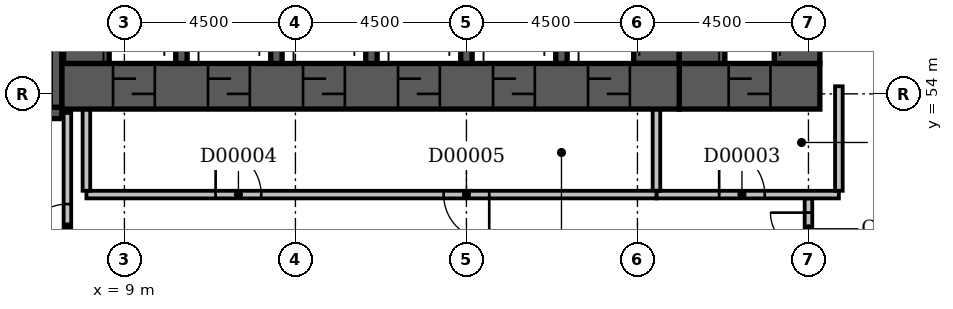
"""IFC4 building model, lengths in metres.
Left out: names, types, materials, properties, quantities, classifications, styles, units other than length and angle.
Written with IfcOpenShell. Run it as: python <this file> out.ifc"""

import sys

from ifc_helpers import new_model, si_unit, direction, frame, frame_2d, origin, place, context, subcontext, project, spatial, rectangle, extrude, element, fill, save


model = new_model("IFC4")
c1 = context("Model", 3, precision=1e-05, world=origin(), true_north=direction((0.0, 1.0)))
c2 = subcontext(c1, "Body", "Model", "MODEL_VIEW")
j1 = project(units=[si_unit("LENGTHUNIT", "METRE"), si_unit("PLANEANGLEUNIT", "RADIAN")], contexts=[c1])
p1 = place(None, origin())
s1 = spatial("IfcSite", under=j1, at=p1, CompositionType="ELEMENT")
p2 = place(p1, origin())
s2 = spatial("IfcBuilding", under=s1, at=p2, CompositionType="ELEMENT")
p3 = place(p2, origin())
s3 = spatial("IfcBuildingStorey", under=s2, at=p3, CompositionType="ELEMENT", Elevation=0.0)
p4 = place(p3, frame((0.35, 53.5, -0.45), z_axis=(0.0, 0.0, 1.0), x_axis=(1.0, 0.0, 0.0)))
e1 = element("IfcWall", 1, at=p4, inside=s3, PredefinedType="SHEAR", context=c2, shape_type="SweptSolid", body=[
    extrude(rectangle(XDim=7.0, YDim=0.3, at=frame_2d((3.5, 0.0))), origin(), (0.0, 0.0, 1.0), 8.85),
])
p5 = place(p4, frame((5.58, 0.0, 0.45)))
e2 = element("IfcOpeningElement", 2, at=p5, cuts=e1, PredefinedType="OPENING", context=c2, shape_type="SweptSolid", body=[
    extrude(rectangle(XDim=1.1, YDim=2.1, at=frame_2d((0.55, 1.05))), frame((0.0, 0.162, 0.0), z_axis=(0.0, -1.0, 0.0), x_axis=(1.0, 0.0, 0.0)), (0.0, 0.0, 1.0), 0.324),
])
p6 = place(p3, frame((7.2, 53.65, -0.45), z_axis=(0.0, 0.0, 1.0), x_axis=(0.0, 1.0, 0.0)))
e3 = element("IfcWall", 3, at=p6, inside=s3, PredefinedType="SHEAR", context=c2, shape_type="SweptSolid", body=[
    extrude(rectangle(XDim=4.2, YDim=0.3, at=frame_2d((2.1, 0.0))), origin(), (0.0, 0.0, 1.0), 8.85),
])
p7 = place(p3, frame((7.35, 54.2, -0.45), z_axis=(0.0, 0.0, 1.0), x_axis=(1.0, 0.0, 0.0)))
e4 = element("IfcWall", 4, at=p7, inside=s3, PredefinedType="SHEAR", context=c2, shape_type="SweptSolid", body=[
    extrude(rectangle(XDim=16.25, YDim=1.2, at=frame_2d((8.125, 0.0))), origin(), (0.0, 0.0, 1.0), 8.85),
])
p8 = place(p7, frame((1.35, 0.0, 0.45)))
e5 = element("IfcOpeningElement", 5, at=p8, cuts=e4, PredefinedType="OPENING", context=c2, shape_type="SweptSolid", body=[
    extrude(rectangle(XDim=1.1, YDim=2.1, at=frame_2d((0.55, 1.05))), frame((0.0, 0.612, 0.0), z_axis=(0.0, -1.0, 0.0), x_axis=(1.0, 0.0, 0.0)), (0.0, 0.0, 1.0), 1.224),
])
p9 = place(p7, frame((3.85, 0.0, 0.45)))
e6 = element("IfcOpeningElement", 6, at=p9, cuts=e4, PredefinedType="OPENING", context=c2, shape_type="SweptSolid", body=[
    extrude(rectangle(XDim=1.1, YDim=2.1, at=frame_2d((0.55, 1.05))), frame((0.0, 0.612, 0.0), z_axis=(0.0, -1.0, 0.0), x_axis=(1.0, 0.0, 0.0)), (0.0, 0.0, 1.0), 1.224),
])
p10 = place(p7, frame((6.35, 0.0, 0.45)))
e7 = element("IfcOpeningElement", 7, at=p10, cuts=e4, PredefinedType="OPENING", context=c2, shape_type="SweptSolid", body=[
    extrude(rectangle(XDim=1.1, YDim=2.1, at=frame_2d((0.55, 1.05))), frame((0.0, 0.612, 0.0), z_axis=(0.0, -1.0, 0.0), x_axis=(1.0, 0.0, 0.0)), (0.0, 0.0, 1.0), 1.224),
])
p11 = place(p7, frame((8.85, 0.0, 0.45)))
e8 = element("IfcOpeningElement", 8, at=p11, cuts=e4, PredefinedType="OPENING", context=c2, shape_type="SweptSolid", body=[
    extrude(rectangle(XDim=1.1, YDim=2.1, at=frame_2d((0.55, 1.05))), frame((0.0, 0.612, 0.0), z_axis=(0.0, -1.0, 0.0), x_axis=(1.0, 0.0, 0.0)), (0.0, 0.0, 1.0), 1.224),
])
p12 = place(p7, frame((11.35, 0.0, 0.45)))
e9 = element("IfcOpeningElement", 9, at=p12, cuts=e4, PredefinedType="OPENING", context=c2, shape_type="SweptSolid", body=[
    extrude(rectangle(XDim=1.1, YDim=2.1, at=frame_2d((0.55, 1.05))), frame((0.0, 0.612, 0.0), z_axis=(0.0, -1.0, 0.0), x_axis=(1.0, 0.0, 0.0)), (0.0, 0.0, 1.0), 1.224),
])
p13 = place(p7, frame((13.85, 0.0, 0.45)))
e10 = element("IfcOpeningElement", 10, at=p13, cuts=e4, PredefinedType="OPENING", context=c2, shape_type="SweptSolid", body=[
    extrude(rectangle(XDim=1.1, YDim=2.1, at=frame_2d((0.55, 1.05))), frame((0.0, 0.612, 0.0), z_axis=(0.0, -1.0, 0.0), x_axis=(1.0, 0.0, 0.0)), (0.0, 0.0, 1.0), 1.224),
])
p14 = place(p3, frame((8.0, 54.8, -0.45), z_axis=(0.0, 0.0, 1.0), x_axis=(0.0, 1.0, 0.0)))
e11 = element("IfcWall", 11, at=p14, inside=s3, PredefinedType="SHEAR", context=c2, shape_type="SweptSolid", body=[
    extrude(rectangle(XDim=2.6, YDim=1.2, at=frame_2d((1.3, 0.0))), origin(), (0.0, 0.0, 1.0), 8.85),
])
for number, where, z_axis, x_axis in (
    (12, (10.5, 54.8, -0.45), (0.0, 0.0, 1.0), (0.0, 1.0, 0.0)),
    (13, (13.0, 54.8, -0.45), (0.0, 0.0, 1.0), (0.0, 1.0, 0.0)),
    (14, (15.5, 54.8, -0.45), (0.0, 0.0, 1.0), (0.0, 1.0, 0.0)),
    (15, (18.0, 54.8, -0.45), (0.0, 0.0, 1.0), (0.0, 1.0, 0.0)),
    (16, (20.5, 54.8, -0.45), (0.0, 0.0, 1.0), (0.0, 1.0, 0.0)),
):
    element("IfcWall", number, at=place(p3, frame(where, z_axis=z_axis, x_axis=x_axis)), inside=s3, PredefinedType="SHEAR", context=c2, shape_type="SweptSolid", body=[
        extrude(rectangle(XDim=2.6, YDim=0.3, at=frame_2d((1.3, 0.0))), origin(), (0.0, 0.0, 1.0), 8.85),
    ])
p15 = place(p3, frame((23.0, 54.8, -0.45), z_axis=(0.0, 0.0, 1.0), x_axis=(0.0, 1.0, 0.0)))
e17 = element("IfcWall", 17, at=p15, inside=s3, PredefinedType="SHEAR", context=c2, shape_type="SweptSolid", body=[
    extrude(rectangle(XDim=2.6, YDim=1.2, at=frame_2d((1.3, 0.0))), origin(), (0.0, 0.0, 1.0), 8.85),
])
p16 = place(p3, frame((23.6, 54.2, -0.45), z_axis=(0.0, 0.0, 1.0), x_axis=(1.0, 0.0, 0.0)))
e18 = element("IfcWall", 18, at=p16, inside=s3, PredefinedType="SHEAR", context=c2, shape_type="SweptSolid", body=[
    extrude(rectangle(XDim=3.7, YDim=1.2, at=frame_2d((1.85, 0.0))), origin(), (0.0, 0.0, 1.0), 8.85),
])
p17 = place(p16, frame((1.3, 0.0, 0.45)))
e19 = element("IfcOpeningElement", 19, at=p17, cuts=e18, PredefinedType="OPENING", context=c2, shape_type="SweptSolid", body=[
    extrude(rectangle(XDim=1.1, YDim=2.1, at=frame_2d((0.55, 1.05))), frame((0.0, 0.612, 0.0), z_axis=(0.0, -1.0, 0.0), x_axis=(1.0, 0.0, 0.0)), (0.0, 0.0, 1.0), 1.224),
])
for number, where, z_axis, x_axis in (
    (20, (24.2, 54.8, -0.45), (0.0, 0.0, 1.0), (0.0, 1.0, 0.0)),
    (21, (26.7, 54.8, -0.45), (0.0, 0.0, 1.0), (0.0, 1.0, 0.0)),
):
    element("IfcWall", number, at=place(p3, frame(where, z_axis=z_axis, x_axis=x_axis)), inside=s3, PredefinedType="SHEAR", context=c2, shape_type="SweptSolid", body=[
        extrude(rectangle(XDim=2.6, YDim=1.2, at=frame_2d((1.3, 0.0))), origin(), (0.0, 0.0, 1.0), 8.85),
    ])
p18 = place(p3, frame((8.0, 51.35, 0.0), z_axis=(0.0, 0.0, 1.0), x_axis=(1.0, 0.0, 0.0)))
e22 = element("IfcWall", 22, at=p18, inside=s3, PredefinedType="PARTITIONING", context=c2, shape_type="SweptSolid", body=[
    extrude(rectangle(XDim=15.0, YDim=0.2, at=frame_2d((7.5, 0.0))), origin(), (0.0, 0.0, 1.0), 8.4),
])
p19 = place(p18, frame((3.4, 0.0, 0.0)))
e23 = element("IfcOpeningElement", 23, at=p19, cuts=e22, PredefinedType="OPENING", context=c2, shape_type="SweptSolid", body=[
    extrude(rectangle(XDim=1.2, YDim=2.1, at=frame_2d((0.6, 1.05))), frame((0.0, 0.112, 0.0), z_axis=(0.0, -1.0, 0.0), x_axis=(1.0, 0.0, 0.0)), (0.0, 0.0, 1.0), 0.224),
])
p20 = place(p18, frame((9.4, 0.0, 0.0)))
e24 = element("IfcOpeningElement", 24, at=p20, cuts=e22, PredefinedType="OPENING", context=c2, shape_type="SweptSolid", body=[
    extrude(rectangle(XDim=1.2, YDim=2.1, at=frame_2d((0.6, 1.05))), frame((0.0, 0.112, 0.0), z_axis=(0.0, -1.0, 0.0), x_axis=(1.0, 0.0, 0.0)), (0.0, 0.0, 1.0), 0.224),
])
for number, where, z_axis, x_axis in (
    (25, (23.0, 51.45, 0.0), (0.0, 0.0, 1.0), (0.0, 1.0, 0.0)),
    (26, (8.0, 51.45, 0.0), (0.0, 0.0, 1.0), (0.0, 1.0, 0.0)),
):
    element("IfcWall", number, at=place(p3, frame(where, z_axis=z_axis, x_axis=x_axis)), inside=s3, PredefinedType="PARTITIONING", context=c2, shape_type="SweptSolid", body=[
        extrude(rectangle(XDim=2.13, YDim=0.2, at=frame_2d((1.065, 0.0))), origin(), (0.0, 0.0, 1.0), 8.4),
    ])
p21 = place(p3, frame((23.0, 51.35, 0.0), z_axis=(0.0, 0.0, 1.0), x_axis=(1.0, 0.0, 0.0)))
e27 = element("IfcWall", 27, at=p21, inside=s3, PredefinedType="PARTITIONING", context=c2, shape_type="SweptSolid", body=[
    extrude(rectangle(XDim=4.8, YDim=0.2, at=frame_2d((2.4, 0.0))), origin(), (0.0, 0.0, 1.0), 8.4),
])
p22 = place(p21, frame((1.65, 0.0, 0.0)))
e28 = element("IfcOpeningElement", 28, at=p22, cuts=e27, PredefinedType="OPENING", context=c2, shape_type="SweptSolid", body=[
    extrude(rectangle(XDim=1.2, YDim=2.1, at=frame_2d((0.6, 1.05))), frame((0.0, 0.112, 0.0), z_axis=(0.0, -1.0, 0.0), x_axis=(1.0, 0.0, 0.0)), (0.0, 0.0, 1.0), 0.224),
])
p23 = place(p3, frame((27.8, 51.45, 0.0), z_axis=(0.0, 0.0, 1.0), x_axis=(0.0, 1.0, 0.0)))
e29 = element("IfcWall", 29, at=p23, inside=s3, PredefinedType="PARTITIONING", context=c2, shape_type="SweptSolid", body=[
    extrude(rectangle(XDim=2.75, YDim=0.2, at=frame_2d((1.375, 0.0))), origin(), (0.0, 0.0, 1.0), 8.4),
])
p24 = place(p3, frame((7.5, 49.6, 0.0), z_axis=(0.0, 0.0, 1.0), x_axis=(0.0, 1.0, 0.0)))
e30 = element("IfcWall", 30, at=p24, inside=s3, PredefinedType="PARTITIONING", context=c2, shape_type="SweptSolid", body=[
    extrude(rectangle(XDim=3.9, YDim=0.2, at=frame_2d((1.95, 0.0))), origin(), (0.0, 0.0, 1.0), 8.4),
])
p25 = place(p24, frame((0.3, 0.0, 0.0)))
e31 = element("IfcOpeningElement", 31, at=p25, cuts=e30, PredefinedType="OPENING", context=c2, shape_type="SweptSolid", body=[
    extrude(rectangle(XDim=1.2, YDim=2.1, at=frame_2d((0.6, 1.05))), frame((0.0, 0.112, 0.0), z_axis=(0.0, -1.0, 0.0), x_axis=(1.0, 0.0, 0.0)), (0.0, 0.0, 1.0), 0.224),
])
p26 = place(p3, frame((27.0, 49.65, 0.0), z_axis=(0.0, 0.0, 1.0), x_axis=(0.0, 1.0, 0.0)))
e32 = element("IfcWall", 32, at=p26, inside=s3, PredefinedType="PARTITIONING", context=c2, shape_type="SweptSolid", body=[
    extrude(rectangle(XDim=1.6, YDim=0.2, at=frame_2d((0.8, 0.0))), origin(), (0.0, 0.0, 1.0), 7.7),
])
p27 = place(p26, frame((0.225, 0.0, 0.0)))
e33 = element("IfcOpeningElement", 33, at=p27, cuts=e32, PredefinedType="OPENING", context=c2, shape_type="SweptSolid", body=[
    extrude(rectangle(XDim=1.0, YDim=2.1, at=frame_2d((0.5, 1.05))), frame((0.0, 0.112, 0.0), z_axis=(0.0, -1.0, 0.0), x_axis=(1.0, 0.0, 0.0)), (0.0, 0.0, 1.0), 0.224),
])
p28 = place(p25, origin())
e34 = element("IfcDoor", 34, at=p28, inside=s3, OperationType="SINGLE_SWING_LEFT", PredefinedType="DOOR", context=c2, shape_type="SweptSolid", body=[
    extrude(rectangle(XDim=1.2, YDim=2.1, at=frame_2d((0.6, 1.05))), frame((0.0, 0.025, 0.0), z_axis=(0.0, -1.0, 0.0), x_axis=(1.0, 0.0, 0.0)), (0.0, 0.0, 1.0), 0.05),
])
fill(e31, e34)
p29 = place(p22, origin())
e35 = element("IfcDoor", 35, at=p29, inside=s3, OperationType="SINGLE_SWING_LEFT", PredefinedType="DOOR", context=c2, shape_type="SweptSolid", body=[
    extrude(rectangle(XDim=1.2, YDim=2.1, at=frame_2d((0.6, 1.05))), frame((0.0, 0.025, 0.0), z_axis=(0.0, -1.0, 0.0), x_axis=(1.0, 0.0, 0.0)), (0.0, 0.0, 1.0), 0.05),
])
fill(e28, e35)
p30 = place(p17, origin())
e36 = element("IfcDoor", 36, at=p30, inside=s3, OperationType="SLIDING_TO_LEFT", PredefinedType="DOOR", context=c2, shape_type="SweptSolid", body=[
    extrude(rectangle(XDim=1.1, YDim=2.1, at=frame_2d((0.55, 1.05))), frame((0.0, 0.025, 0.0), z_axis=(0.0, -1.0, 0.0), x_axis=(1.0, 0.0, 0.0)), (0.0, 0.0, 1.0), 0.05),
])
fill(e19, e36)
p31 = place(p8, origin())
e37 = element("IfcDoor", 37, at=p31, inside=s3, OperationType="SLIDING_TO_LEFT", PredefinedType="DOOR", context=c2, shape_type="SweptSolid", body=[
    extrude(rectangle(XDim=1.1, YDim=2.1, at=frame_2d((0.55, 1.05))), frame((0.0, 0.025, 0.0), z_axis=(0.0, -1.0, 0.0), x_axis=(1.0, 0.0, 0.0)), (0.0, 0.0, 1.0), 0.05),
])
fill(e5, e37)
p32 = place(p9, origin())
e38 = element("IfcDoor", 38, at=p32, inside=s3, OperationType="SLIDING_TO_LEFT", PredefinedType="DOOR", context=c2, shape_type="SweptSolid", body=[
    extrude(rectangle(XDim=1.1, YDim=2.1, at=frame_2d((0.55, 1.05))), frame((0.0, 0.025, 0.0), z_axis=(0.0, -1.0, 0.0), x_axis=(1.0, 0.0, 0.0)), (0.0, 0.0, 1.0), 0.05),
])
fill(e6, e38)
p33 = place(p10, origin())
e39 = element("IfcDoor", 39, at=p33, inside=s3, OperationType="SLIDING_TO_LEFT", PredefinedType="DOOR", context=c2, shape_type="SweptSolid", body=[
    extrude(rectangle(XDim=1.1, YDim=2.1, at=frame_2d((0.55, 1.05))), frame((0.0, 0.025, 0.0), z_axis=(0.0, -1.0, 0.0), x_axis=(1.0, 0.0, 0.0)), (0.0, 0.0, 1.0), 0.05),
])
fill(e7, e39)
p34 = place(p11, origin())
e40 = element("IfcDoor", 40, at=p34, inside=s3, OperationType="SLIDING_TO_LEFT", PredefinedType="DOOR", context=c2, shape_type="SweptSolid", body=[
    extrude(rectangle(XDim=1.1, YDim=2.1, at=frame_2d((0.55, 1.05))), frame((0.0, 0.025, 0.0), z_axis=(0.0, -1.0, 0.0), x_axis=(1.0, 0.0, 0.0)), (0.0, 0.0, 1.0), 0.05),
])
fill(e8, e40)
p35 = place(p12, origin())
e41 = element("IfcDoor", 41, at=p35, inside=s3, OperationType="SLIDING_TO_LEFT", PredefinedType="DOOR", context=c2, shape_type="SweptSolid", body=[
    extrude(rectangle(XDim=1.1, YDim=2.1, at=frame_2d((0.55, 1.05))), frame((0.0, 0.025, 0.0), z_axis=(0.0, -1.0, 0.0), x_axis=(1.0, 0.0, 0.0)), (0.0, 0.0, 1.0), 0.05),
])
fill(e9, e41)
p36 = place(p13, origin())
e42 = element("IfcDoor", 42, at=p36, inside=s3, OperationType="SLIDING_TO_LEFT", PredefinedType="DOOR", context=c2, shape_type="SweptSolid", body=[
    extrude(rectangle(XDim=1.1, YDim=2.1, at=frame_2d((0.55, 1.05))), frame((0.0, 0.025, 0.0), z_axis=(0.0, -1.0, 0.0), x_axis=(1.0, 0.0, 0.0)), (0.0, 0.0, 1.0), 0.05),
])
fill(e10, e42)
p37 = place(p19, origin())
e43 = element("IfcDoor", 43, at=p37, inside=s3, OperationType="SINGLE_SWING_LEFT", PredefinedType="DOOR", context=c2, shape_type="SweptSolid", body=[
    extrude(rectangle(XDim=1.2, YDim=2.1, at=frame_2d((0.6, 1.05))), frame((0.0, 0.025, 0.0), z_axis=(0.0, -1.0, 0.0), x_axis=(1.0, 0.0, 0.0)), (0.0, 0.0, 1.0), 0.05),
])
fill(e23, e43)
p38 = place(p20, origin())
e44 = element("IfcDoor", 44, at=p38, inside=s3, OperationType="SINGLE_SWING_RIGHT", PredefinedType="DOOR", context=c2, shape_type="SweptSolid", body=[
    extrude(rectangle(XDim=1.2, YDim=2.1, at=frame_2d((0.6, 1.05))), frame((0.0, 0.025, 0.0), z_axis=(0.0, -1.0, 0.0), x_axis=(1.0, 0.0, 0.0)), (0.0, 0.0, 1.0), 0.05),
])
fill(e24, e44)
p39 = place(p27, frame((1.0, 0.0, 0.0), z_axis=(0.0, 0.0, 1.0), x_axis=(-1.0, 0.0, 0.0)))
e45 = element("IfcDoor", 45, at=p39, inside=s3, OperationType="SINGLE_SWING_LEFT", PredefinedType="DOOR", context=c2, shape_type="SweptSolid", body=[
    extrude(rectangle(XDim=1.0, YDim=2.1, at=frame_2d((0.5, 1.05))), frame((0.0, 0.025, 0.0), z_axis=(0.0, -1.0, 0.0), x_axis=(1.0, 0.0, 0.0)), (0.0, 0.0, 1.0), 0.05),
])
fill(e33, e45)
save(model, sys.argv[1])
